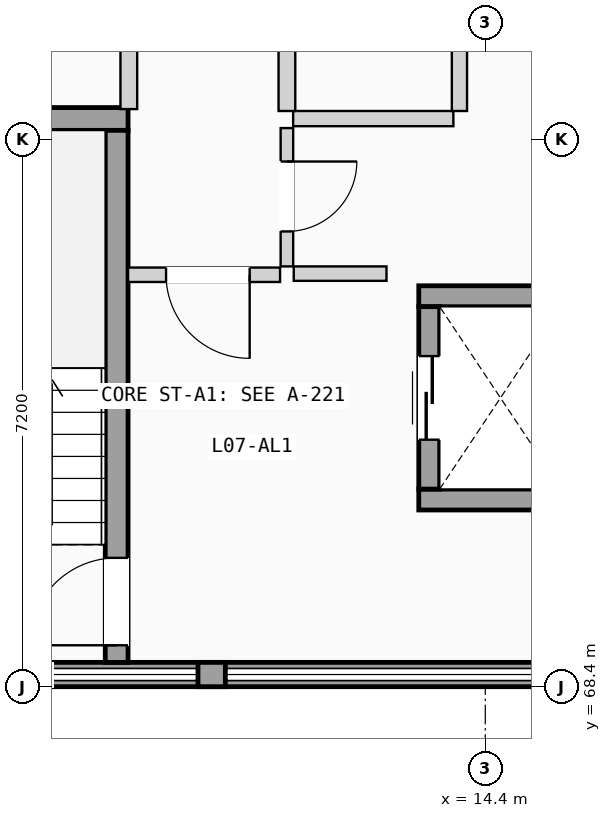
"""IFC4 building model, lengths in metres.
Left out: names, types, materials, properties, quantities, classifications, styles, units other than length and angle.
Written with IfcOpenShell. Run it as: python <this file> out.ifc"""

import sys

from ifc_helpers import new_model, si_unit, direction, frame, frame_2d, origin, place, context, subcontext, project, spatial, rectangle, extrude, element, fill, save


model = new_model("IFC4")
c1 = context("Model", 3, precision=1e-05, world=origin(), true_north=direction((0.0, 1.0)))
c2 = subcontext(c1, "Body", "Model", "MODEL_VIEW")
j1 = project(units=[si_unit("LENGTHUNIT", "METRE"), si_unit("PLANEANGLEUNIT", "RADIAN")], contexts=[c1])
p1 = place(None, origin())
s1 = spatial("IfcSite", under=j1, at=p1, CompositionType="ELEMENT")
p2 = place(p1, origin())
s2 = spatial("IfcBuilding", under=s1, at=p2, CompositionType="ELEMENT")
p3 = place(p2, frame((0.0, 0.0, 24.675)))
s3 = spatial("IfcBuildingStorey", under=s2, at=p3, CompositionType="ELEMENT", Elevation=24.675)
p4 = place(p3, frame((0.0, 68.56, 0.0), z_axis=(0.0, 0.0, 1.0), x_axis=(1.0, 0.0, 0.0)))
e1 = element("IfcWall", 1, at=p4, inside=s3, PredefinedType="SOLIDWALL", context=c2, shape_type="SweptSolid", body=[
    extrude(rectangle(XDim=21.6, YDim=0.32, at=frame_2d((10.8, 0.0))), origin(), (0.0, 0.0, 1.0), 1.11),
])
p5 = place(p3, frame((10.62, 68.56, 1.11), z_axis=(0.0, 0.0, 1.0), x_axis=(1.0, 0.0, 0.0)))
e2 = element("IfcWall", 2, at=p5, inside=s3, PredefinedType="SOLIDWALL", context=c2, shape_type="SweptSolid", body=[
    extrude(rectangle(XDim=0.36, YDim=0.32, at=frame_2d((0.18, 0.0))), origin(), (0.0, 0.0, 1.0), 1.79),
])
p6 = place(p3, frame((5.7, 75.87, 0.0), z_axis=(0.0, 0.0, 1.0), x_axis=(1.0, 0.0, 0.0)))
e3 = element("IfcWall", 3, at=p6, inside=s3, PredefinedType="SHEAR", context=c2, shape_type="SweptSolid", body=[
    extrude(rectangle(XDim=4.0, YDim=0.3, at=frame_2d((2.0, 0.0))), origin(), (0.0, 0.0, 1.0), 2.9),
])
p7 = place(p3, frame((9.55, 68.72, 0.0), z_axis=(0.0, 0.0, 1.0), x_axis=(0.0, 1.0, 0.0)))
e4 = element("IfcWall", 4, at=p7, inside=s3, PredefinedType="SHEAR", context=c2, shape_type="SweptSolid", body=[
    extrude(rectangle(XDim=7.0, YDim=0.3, at=frame_2d((3.5, 0.0))), origin(), (0.0, 0.0, 1.0), 2.9),
])
p8 = place(p7, frame((0.225, 0.0, 0.0)))
e5 = element("IfcOpeningElement", 5, at=p8, cuts=e4, PredefinedType="OPENING", context=c2, shape_type="SweptSolid", body=[
    extrude(rectangle(XDim=1.15, YDim=2.12, at=frame_2d((0.575, 1.06))), frame((0.0, 0.16, 0.0), z_axis=(0.0, -1.0, 0.0), x_axis=(1.0, 0.0, 0.0)), (0.0, 0.0, 1.0), 0.32),
])
for number, where, z_axis, x_axis in (
    (6, (13.525, 70.863, 0.0), (0.0, 0.0, 1.0), (1.0, 0.0, 0.0)),
    (7, (13.525, 73.538, 0.0), (0.0, 0.0, 1.0), (1.0, 0.0, 0.0)),
):
    element("IfcWall", number, at=place(p3, frame(where, z_axis=z_axis, x_axis=x_axis)), inside=s3, PredefinedType="SHEAR", context=c2, shape_type="SweptSolid", body=[
        extrude(rectangle(XDim=2.15, YDim=0.275, at=frame_2d((1.075, 0.0))), origin(), (0.0, 0.0, 1.0), 2.9),
    ])
p9 = place(p3, frame((13.663, 71.0, 0.0), z_axis=(0.0, 0.0, 1.0), x_axis=(0.0, 1.0, 0.0)))
e8 = element("IfcWall", 8, at=p9, inside=s3, PredefinedType="SHEAR", context=c2, shape_type="SweptSolid", body=[
    extrude(rectangle(XDim=2.4, YDim=0.275, at=frame_2d((1.2, 0.0))), origin(), (0.0, 0.0, 1.0), 2.9),
])
p10 = place(p9, frame((0.65, 0.0, 0.0)))
e9 = element("IfcOpeningElement", 9, at=p10, cuts=e8, PredefinedType="OPENING", context=c2, shape_type="SweptSolid", body=[
    extrude(rectangle(XDim=1.1, YDim=2.15, at=frame_2d((0.55, 1.075))), frame((0.0, 0.147, 0.0), z_axis=(0.0, -1.0, 0.0), x_axis=(1.0, 0.0, 0.0)), (0.0, 0.0, 1.0), 0.295),
])
p11 = place(p3, frame((11.88, 73.835, 0.0), z_axis=(0.0, 0.0, 1.0), x_axis=(1.0, 0.0, 0.0)))
e10 = element("IfcWall", 10, at=p11, inside=s3, PredefinedType="PARTITIONING", context=c2, shape_type="SweptSolid", body=[
    extrude(rectangle(XDim=1.22, YDim=0.19, at=frame_2d((0.61, 0.0))), origin(), (0.0, 0.0, 1.0), 2.87),
])
p12 = place(p3, frame((9.7, 73.82, 0.0), z_axis=(0.0, 0.0, 1.0), x_axis=(1.0, 0.0, 0.0)))
e11 = element("IfcWall", 11, at=p12, inside=s3, PredefinedType="PARTITIONING", context=c2, shape_type="SweptSolid", body=[
    extrude(rectangle(XDim=2.0, YDim=0.19, at=frame_2d((1.0, 0.0))), origin(), (0.0, 0.0, 1.0), 2.87),
])
p13 = place(p12, frame((0.5, 0.0, 0.0)))
e12 = element("IfcOpeningElement", 12, at=p13, cuts=e11, PredefinedType="OPENING", context=c2, shape_type="SweptSolid", body=[
    extrude(rectangle(XDim=1.1, YDim=2.12, at=frame_2d((0.55, 1.06))), frame((0.0, 0.105, 0.0), z_axis=(0.0, -1.0, 0.0), x_axis=(1.0, 0.0, 0.0)), (0.0, 0.0, 1.0), 0.21),
])
p14 = place(p3, frame((11.79, 73.93, 0.0), z_axis=(0.0, 0.0, 1.0), x_axis=(0.0, 1.0, 0.0)))
e13 = element("IfcWall", 13, at=p14, inside=s3, PredefinedType="PARTITIONING", context=c2, shape_type="SweptSolid", body=[
    extrude(rectangle(XDim=1.82, YDim=0.165, at=frame_2d((0.91, 0.0))), origin(), (0.0, 0.0, 1.0), 2.87),
])
p15 = place(p14, frame((0.46, 0.0, 0.0)))
e14 = element("IfcOpeningElement", 14, at=p15, cuts=e13, PredefinedType="OPENING", context=c2, shape_type="SweptSolid", body=[
    extrude(rectangle(XDim=0.92, YDim=2.04, at=frame_2d((0.46, 1.02))), frame((0.0, 0.093, 0.0), z_axis=(0.0, -1.0, 0.0), x_axis=(1.0, 0.0, 0.0)), (0.0, 0.0, 1.0), 0.185),
])
p16 = place(p3, frame((11.872, 75.875, 0.0), z_axis=(0.0, 0.0, 1.0), x_axis=(1.0, 0.0, 0.0)))
e15 = element("IfcWall", 15, at=p16, inside=s3, PredefinedType="PLUMBINGWALL", context=c2, shape_type="SweptSolid", body=[
    extrude(rectangle(XDim=2.108, YDim=0.2, at=frame_2d((1.054, 0.0))), origin(), (0.0, 0.0, 1.0), 2.87),
])
p17 = place(p3, frame((9.71, 76.0, 0.0), z_axis=(0.0, 0.0, 1.0), x_axis=(0.0, 1.0, 0.0)))
e16 = element("IfcWall", 16, at=p17, inside=s3, PredefinedType="PLUMBINGWALL", context=c2, shape_type="SweptSolid", body=[
    extrude(rectangle(XDim=7.67, YDim=0.22, at=frame_2d((3.835, 0.0))), origin(), (0.0, 0.0, 1.0), 2.87),
])
p18 = place(p3, frame((11.79, 75.975, 0.0), z_axis=(0.0, 0.0, 1.0), x_axis=(0.0, 1.0, 0.0)))
e17 = element("IfcWall", 17, at=p18, inside=s3, PredefinedType="PLUMBINGWALL", context=c2, shape_type="SweptSolid", body=[
    extrude(rectangle(XDim=7.695, YDim=0.22, at=frame_2d((3.847, 0.0))), origin(), (0.0, 0.0, 1.0), 2.87),
])
p19 = place(p3, frame((14.06, 75.975, 0.0), z_axis=(0.0, 0.0, 1.0), x_axis=(0.0, 1.0, 0.0)))
e18 = element("IfcWall", 18, at=p19, inside=s3, PredefinedType="PLUMBINGWALL", context=c2, shape_type="SweptSolid", body=[
    extrude(rectangle(XDim=7.715, YDim=0.2, at=frame_2d((3.857, 0.0))), origin(), (0.0, 0.0, 1.0), 2.87),
])
p20 = place(p19, frame((3.435, 0.0, 0.0)))
e19 = element("IfcOpeningElement", 19, at=p20, cuts=e18, PredefinedType="OPENING", context=c2, shape_type="SweptSolid", body=[
    extrude(rectangle(XDim=0.85, YDim=2.01, at=frame_2d((0.425, 1.005))), frame((0.0, 0.11, 0.0), z_axis=(0.0, -1.0, 0.0), x_axis=(1.0, 0.0, 0.0)), (0.0, 0.0, 1.0), 0.22),
])
p21 = place(p8, origin())
e20 = element("IfcDoor", 20, at=p21, inside=s3, OperationType="SINGLE_SWING_LEFT", PredefinedType="DOOR", context=c2, shape_type="SweptSolid", body=[
    extrude(rectangle(XDim=1.15, YDim=2.12, at=frame_2d((0.575, 1.06))), frame((0.0, 0.025, 0.0), z_axis=(0.0, -1.0, 0.0), x_axis=(1.0, 0.0, 0.0)), (0.0, 0.0, 1.0), 0.05),
])
fill(e5, e20)
p22 = place(p10, origin())
e21 = element("IfcDoor", 21, at=p22, inside=s3, OperationType="SLIDING_TO_LEFT", PredefinedType="DOOR", context=c2, shape_type="SweptSolid", body=[
    extrude(rectangle(XDim=1.1, YDim=2.15, at=frame_2d((0.55, 1.075))), frame((0.0, 0.025, 0.0), z_axis=(0.0, -1.0, 0.0), x_axis=(1.0, 0.0, 0.0)), (0.0, 0.0, 1.0), 0.05),
])
fill(e9, e21)
p23 = place(p13, frame((1.1, 0.0, 0.0), z_axis=(0.0, 0.0, 1.0), x_axis=(-1.0, 0.0, 0.0)))
e22 = element("IfcDoor", 22, at=p23, inside=s3, OperationType="SINGLE_SWING_RIGHT", PredefinedType="DOOR", context=c2, shape_type="SweptSolid", body=[
    extrude(rectangle(XDim=1.1, YDim=2.12, at=frame_2d((0.55, 1.06))), frame((0.0, 0.025, 0.0), z_axis=(0.0, -1.0, 0.0), x_axis=(1.0, 0.0, 0.0)), (0.0, 0.0, 1.0), 0.05),
])
fill(e12, e22)
p24 = place(p15, frame((0.92, 0.0, 0.0), z_axis=(0.0, 0.0, 1.0), x_axis=(-1.0, 0.0, 0.0)))
e23 = element("IfcDoor", 23, at=p24, inside=s3, OperationType="SINGLE_SWING_RIGHT", PredefinedType="DOOR", context=c2, shape_type="SweptSolid", body=[
    extrude(rectangle(XDim=0.92, YDim=2.04, at=frame_2d((0.46, 1.02))), frame((0.0, 0.025, 0.0), z_axis=(0.0, -1.0, 0.0), x_axis=(1.0, 0.0, 0.0)), (0.0, 0.0, 1.0), 0.05),
])
fill(e14, e23)
save(model, sys.argv[1])
